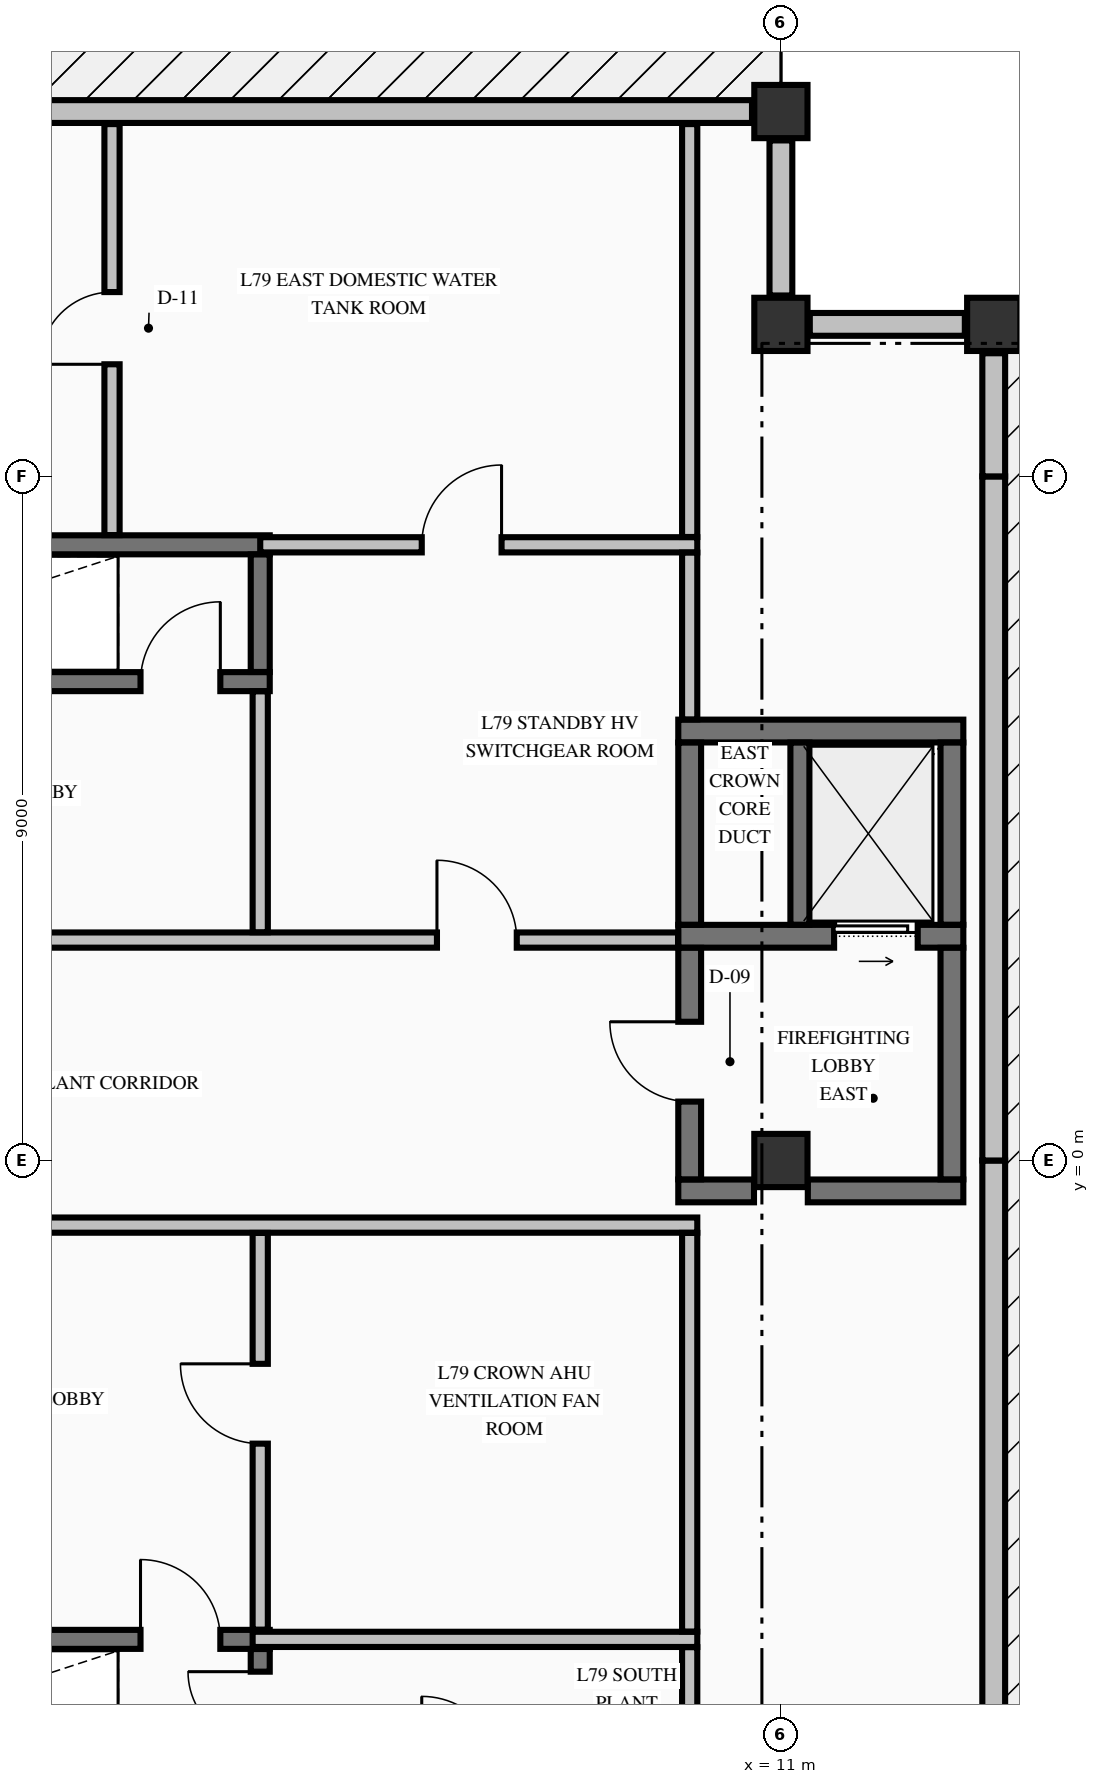
"""IFC4 building model, lengths in metres.
Left out: names, types, materials, properties, quantities, classifications, styles, units other than length and angle.
Written with IfcOpenShell. Run it as: python <this file> out.ifc"""

import sys

from ifc_helpers import new_model, si_unit, direction, frame, frame_2d, origin, origin_2d, place, context, subcontext, project, spatial, rectangle, extrude, element, fill, save


model = new_model("IFC4")
c1 = context("Model", 3, precision=1e-05, world=origin(), true_north=direction((0.0, 1.0)))
c2 = subcontext(c1, "Body", "Model", "MODEL_VIEW")
j1 = project(units=[si_unit("LENGTHUNIT", "METRE"), si_unit("PLANEANGLEUNIT", "RADIAN")], contexts=[c1])
p1 = place(None, origin())
s1 = spatial("IfcSite", under=j1, at=p1, CompositionType="ELEMENT")
p2 = place(p1, origin())
s2 = spatial("IfcBuilding", under=s1, at=p2, CompositionType="ELEMENT")
p3 = place(p2, frame((0.0, 0.0, 294.04)))
s3 = spatial("IfcBuildingStorey", under=s2, at=p3, CompositionType="ELEMENT", Elevation=294.04)
for number, where, z_axis, x_axis in (
    (1, (13.8, 11.0, -0.325), (0.0, 0.0, 1.0), (1.0, 0.0, 0.0)),
    (2, (11.0, 13.8, -0.325), (0.0, 0.0, 1.0), (1.0, 0.0, 0.0)),
    (3, (11.0, 11.0, -0.325), (0.0, 0.0, 1.0), (1.0, 0.0, 0.0)),
    (4, (11.0, 0.0, -0.325), (0.0, 0.0, 1.0), (1.0, 0.0, 0.0)),
):
    element("IfcColumn", number, at=place(p3, frame(where, z_axis=z_axis, x_axis=x_axis)), inside=s3, PredefinedType="COLUMN", context=c2, shape_type="SweptSolid", body=[
        extrude(rectangle(XDim=0.7, YDim=0.7, at=origin_2d()), origin(), (0.0, 0.0, 1.0), 2.935),
    ])
p4 = place(p3, frame((10.62, 13.8, 0.0), z_axis=(0.0, 0.0, 1.0), x_axis=(-1.0, 0.0, 0.0)))
e5 = element("IfcWall", 5, at=p4, inside=s3, PredefinedType="STANDARD", context=c2, shape_type="SweptSolid", body=[
    extrude(rectangle(XDim=10.24, YDim=0.3, at=frame_2d((5.12, 0.0))), origin(), (0.0, 0.0, 1.0), 2.002),
])
for number, where, z_axis, x_axis in (
    (6, (13.8, -9.0, 0.0), (0.0, 0.0, 1.0), (0.0, 1.0, 0.0)),
    (7, (13.8, 0.0, 0.0), (0.0, 0.0, 1.0), (0.0, 1.0, 0.0)),
):
    element("IfcWall", number, at=place(p3, frame(where, z_axis=z_axis, x_axis=x_axis)), inside=s3, PredefinedType="STANDARD", context=c2, shape_type="SweptSolid", body=[
        extrude(rectangle(XDim=9.0, YDim=0.3, at=frame_2d((4.5, 0.0))), origin(), (0.0, 0.0, 1.0), 2.002),
    ])
p5 = place(p3, frame((13.8, 9.0, 0.0), z_axis=(0.0, 0.0, 1.0), x_axis=(0.0, 1.0, 0.0)))
e8 = element("IfcWall", 8, at=p5, inside=s3, PredefinedType="STANDARD", context=c2, shape_type="SweptSolid", body=[
    extrude(rectangle(XDim=1.62, YDim=0.3, at=frame_2d((0.81, 0.0))), origin(), (0.0, 0.0, 1.0), 2.002),
])
for number, where, z_axis, x_axis in (
    (9, (13.42, 11.0, 0.0), (0.0, 0.0, 1.0), (-1.0, 0.0, 0.0)),
    (10, (11.0, 11.38, 0.0), (0.0, 0.0, 1.0), (0.0, 1.0, 0.0)),
):
    element("IfcWall", number, at=place(p3, frame(where, z_axis=z_axis, x_axis=x_axis)), inside=s3, PredefinedType="STANDARD", context=c2, shape_type="SweptSolid", body=[
        extrude(rectangle(XDim=2.04, YDim=0.3, at=frame_2d((1.02, 0.0))), origin(), (0.0, 0.0, 1.0), 2.002),
    ])
p6 = place(p3, frame((-4.475, -6.3, 0.0), z_axis=(0.0, 0.0, 1.0), x_axis=(1.0, 0.0, 0.0)))
e11 = element("IfcWall", 11, at=p6, inside=s3, PredefinedType="SOLIDWALL", context=c2, shape_type="SweptSolid", body=[
    extrude(rectangle(XDim=8.75, YDim=0.25, at=frame_2d((4.375, 0.0))), origin(), (0.0, 0.0, 1.0), 2.61),
])
p7 = place(p6, frame((7.05, 0.0, 0.0)))
e12 = element("IfcOpeningElement", 12, at=p7, cuts=e11, PredefinedType="OPENING", context=c2, shape_type="SweptSolid", body=[
    extrude(rectangle(XDim=1.05, YDim=2.15, at=frame_2d((0.525, 1.075))), frame((0.0, 0.135, 0.0), z_axis=(0.0, -1.0, 0.0), x_axis=(1.0, 0.0, 0.0)), (0.0, 0.0, 1.0), 0.27),
])
p8 = place(p3, frame((9.65, -0.4, 0.0), z_axis=(0.0, 0.0, 1.0), x_axis=(1.0, 0.0, 0.0)))
e13 = element("IfcWall", 13, at=p8, inside=s3, PredefinedType="SHEAR", context=c2, shape_type="SweptSolid", body=[
    extrude(rectangle(XDim=0.996, YDim=0.3, at=frame_2d((0.498, 0.0))), origin(), (0.0, 0.0, 1.0), 2.61),
])
p9 = place(p3, frame((11.354, -0.4, 0.0), z_axis=(0.0, 0.0, 1.0), x_axis=(1.0, 0.0, 0.0)))
e14 = element("IfcWall", 14, at=p9, inside=s3, PredefinedType="SHEAR", context=c2, shape_type="SweptSolid", body=[
    extrude(rectangle(XDim=2.046, YDim=0.3, at=frame_2d((1.023, 0.0))), origin(), (0.0, 0.0, 1.0), 2.61),
])
p10 = place(p3, frame((9.65, 2.95, 0.0), z_axis=(0.0, 0.0, 1.0), x_axis=(1.0, 0.0, 0.0)))
e15 = element("IfcWall", 15, at=p10, inside=s3, PredefinedType="SHEAR", context=c2, shape_type="SweptSolid", body=[
    extrude(rectangle(XDim=3.75, YDim=0.3, at=frame_2d((1.875, 0.0))), origin(), (0.0, 0.0, 1.0), 2.61),
])
p11 = place(p10, frame((2.05, 0.0, 0.0)))
e16 = element("IfcOpeningElement", 16, at=p11, cuts=e15, PredefinedType="OPENING", context=c2, shape_type="SweptSolid", body=[
    extrude(rectangle(XDim=1.1, YDim=2.2, at=frame_2d((0.55, 1.1))), frame((0.0, 0.16, 0.0), z_axis=(0.0, -1.0, 0.0), x_axis=(1.0, 0.0, 0.0)), (0.0, 0.0, 1.0), 0.32),
])
p12 = place(p3, frame((9.65, 5.65, 0.0), z_axis=(0.0, 0.0, 1.0), x_axis=(1.0, 0.0, 0.0)))
e17 = element("IfcWall", 17, at=p12, inside=s3, PredefinedType="SHEAR", context=c2, shape_type="SweptSolid", body=[
    extrude(rectangle(XDim=3.75, YDim=0.3, at=frame_2d((1.875, 0.0))), origin(), (0.0, 0.0, 1.0), 2.61),
])
p13 = place(p3, frame((-4.475, 6.3, 0.0), z_axis=(0.0, 0.0, 1.0), x_axis=(1.0, 0.0, 0.0)))
e18 = element("IfcWall", 18, at=p13, inside=s3, PredefinedType="SOLIDWALL", context=c2, shape_type="SweptSolid", body=[
    extrude(rectangle(XDim=8.75, YDim=0.25, at=frame_2d((4.375, 0.0))), origin(), (0.0, 0.0, 1.0), 2.61),
])
p14 = place(p13, frame((7.05, 0.0, 0.0)))
e19 = element("IfcOpeningElement", 19, at=p14, cuts=e18, PredefinedType="OPENING", context=c2, shape_type="SweptSolid", body=[
    extrude(rectangle(XDim=1.05, YDim=2.15, at=frame_2d((0.525, 1.075))), frame((0.0, 0.135, 0.0), z_axis=(0.0, -1.0, 0.0), x_axis=(1.0, 0.0, 0.0)), (0.0, 0.0, 1.0), 0.27),
])
p15 = place(p3, frame((-4.475, 8.1, 0.0), z_axis=(0.0, 0.0, 1.0), x_axis=(1.0, 0.0, 0.0)))
e20 = element("IfcWall", 20, at=p15, inside=s3, PredefinedType="SOLIDWALL", context=c2, shape_type="SweptSolid", body=[
    extrude(rectangle(XDim=8.75, YDim=0.25, at=frame_2d((4.375, 0.0))), origin(), (0.0, 0.0, 1.0), 2.61),
])
p16 = place(p3, frame((4.05, -6.3, 0.0), z_axis=(0.0, 0.0, 1.0), x_axis=(1.0, 0.0, 0.0)))
e21 = element("IfcWall", 21, at=p16, inside=s3, PredefinedType="PARTITIONING", context=c2, shape_type="SweptSolid", body=[
    extrude(rectangle(XDim=5.85, YDim=0.2, at=frame_2d((2.925, 0.0))), origin(), (0.0, 0.0, 1.0), 2.61),
])
p17 = place(p3, frame((-9.9, -0.85, 0.0), z_axis=(0.0, 0.0, 1.0), x_axis=(1.0, 0.0, 0.0)))
e22 = element("IfcWall", 22, at=p17, inside=s3, PredefinedType="PARTITIONING", context=c2, shape_type="SweptSolid", body=[
    extrude(rectangle(XDim=19.8, YDim=0.2, at=frame_2d((9.9, 0.0))), origin(), (0.0, 0.0, 1.0), 2.61),
])
p18 = place(p17, frame((6.85, 0.0, 0.0)))
e23 = element("IfcOpeningElement", 23, at=p18, cuts=e22, PredefinedType="OPENING", context=c2, shape_type="SweptSolid", body=[
    extrude(rectangle(XDim=1.1, YDim=2.15, at=frame_2d((0.55, 1.075))), frame((0.0, 0.11, 0.0), z_axis=(0.0, -1.0, 0.0), x_axis=(1.0, 0.0, 0.0)), (0.0, 0.0, 1.0), 0.22),
])
p19 = place(p3, frame((-9.647, 2.9, 0.0), z_axis=(0.0, 0.0, 1.0), x_axis=(1.0, 0.0, 0.0)))
e24 = element("IfcWall", 24, at=p19, inside=s3, PredefinedType="PARTITIONING", context=c2, shape_type="SweptSolid", body=[
    extrude(rectangle(XDim=19.294, YDim=0.2, at=frame_2d((9.647, 0.0))), origin(), (0.0, 0.0, 1.0), 2.61),
])
p20 = place(p19, frame((6.597, 0.0, 0.0)))
e25 = element("IfcOpeningElement", 25, at=p20, cuts=e24, PredefinedType="OPENING", context=c2, shape_type="SweptSolid", body=[
    extrude(rectangle(XDim=1.1, YDim=2.15, at=frame_2d((0.55, 1.075))), frame((0.0, 0.11, 0.0), z_axis=(0.0, -1.0, 0.0), x_axis=(1.0, 0.0, 0.0)), (0.0, 0.0, 1.0), 0.22),
])
p21 = place(p19, frame((16.122, 0.0, 0.0)))
e26 = element("IfcOpeningElement", 26, at=p21, cuts=e24, PredefinedType="OPENING", context=c2, shape_type="SweptSolid", body=[
    extrude(rectangle(XDim=1.05, YDim=2.15, at=frame_2d((0.525, 1.075))), frame((0.0, 0.11, 0.0), z_axis=(0.0, -1.0, 0.0), x_axis=(1.0, 0.0, 0.0)), (0.0, 0.0, 1.0), 0.22),
])
p22 = place(p19, frame((2.122, 0.0, 0.0)))
e27 = element("IfcOpeningElement", 27, at=p22, cuts=e24, PredefinedType="OPENING", context=c2, shape_type="SweptSolid", body=[
    extrude(rectangle(XDim=1.05, YDim=2.15, at=frame_2d((0.525, 1.075))), frame((0.0, 0.11, 0.0), z_axis=(0.0, -1.0, 0.0), x_axis=(1.0, 0.0, 0.0)), (0.0, 0.0, 1.0), 0.22),
])
p23 = place(p3, frame((4.15, 8.1, 0.0), z_axis=(0.0, 0.0, 1.0), x_axis=(1.0, 0.0, 0.0)))
e28 = element("IfcWall", 28, at=p23, inside=s3, PredefinedType="PARTITIONING", context=c2, shape_type="SweptSolid", body=[
    extrude(rectangle(XDim=5.75, YDim=0.2, at=frame_2d((2.875, 0.0))), origin(), (0.0, 0.0, 1.0), 2.61),
])
p24 = place(p23, frame((2.125, 0.0, 0.0)))
e29 = element("IfcOpeningElement", 29, at=p24, cuts=e28, PredefinedType="OPENING", context=c2, shape_type="SweptSolid", body=[
    extrude(rectangle(XDim=1.05, YDim=2.15, at=frame_2d((0.525, 1.075))), frame((0.0, 0.11, 0.0), z_axis=(0.0, -1.0, 0.0), x_axis=(1.0, 0.0, 0.0)), (0.0, 0.0, 1.0), 0.22),
])
p25 = place(p3, frame((4.15, -7.973, 0.0), z_axis=(0.0, 0.0, 1.0), x_axis=(0.0, 1.0, 0.0)))
e30 = element("IfcWall", 30, at=p25, inside=s3, PredefinedType="SOLIDWALL", context=c2, shape_type="SweptSolid", body=[
    extrude(rectangle(XDim=1.546, YDim=0.25, at=frame_2d((0.773, 0.0))), origin(), (0.0, 0.0, 1.0), 2.61),
])
p26 = place(p25, frame((0.298, 0.0, 0.0)))
e31 = element("IfcOpeningElement", 31, at=p26, cuts=e30, PredefinedType="OPENING", context=c2, shape_type="SweptSolid", body=[
    extrude(rectangle(XDim=0.95, YDim=2.15, at=frame_2d((0.475, 1.075))), frame((0.0, 0.135, 0.0), z_axis=(0.0, -1.0, 0.0), x_axis=(1.0, 0.0, 0.0)), (0.0, 0.0, 1.0), 0.27),
])
p27 = place(p3, frame((4.15, 6.427, 0.0), z_axis=(0.0, 0.0, 1.0), x_axis=(0.0, 1.0, 0.0)))
e32 = element("IfcWall", 32, at=p27, inside=s3, PredefinedType="SOLIDWALL", context=c2, shape_type="SweptSolid", body=[
    extrude(rectangle(XDim=1.546, YDim=0.25, at=frame_2d((0.773, 0.0))), origin(), (0.0, 0.0, 1.0), 2.61),
])
p28 = place(p3, frame((9.8, -0.248, 0.0), z_axis=(0.0, 0.0, 1.0), x_axis=(0.0, 1.0, 0.0)))
e33 = element("IfcWall", 33, at=p28, inside=s3, PredefinedType="SHEAR", context=c2, shape_type="SweptSolid", body=[
    extrude(rectangle(XDim=3.046, YDim=0.3, at=frame_2d((1.523, 0.0))), origin(), (0.0, 0.0, 1.0), 2.61),
])
p29 = place(p28, frame((1.023, 0.0, 0.0)))
e34 = element("IfcOpeningElement", 34, at=p29, cuts=e33, PredefinedType="OPENING", context=c2, shape_type="SweptSolid", body=[
    extrude(rectangle(XDim=1.05, YDim=2.15, at=frame_2d((0.525, 1.075))), frame((0.0, 0.16, 0.0), z_axis=(0.0, -1.0, 0.0), x_axis=(1.0, 0.0, 0.0)), (0.0, 0.0, 1.0), 0.32),
])
p30 = place(p3, frame((9.8, 3.102, 0.0), z_axis=(0.0, 0.0, 1.0), x_axis=(0.0, 1.0, 0.0)))
e35 = element("IfcWall", 35, at=p30, inside=s3, PredefinedType="SHEAR", context=c2, shape_type="SweptSolid", body=[
    extrude(rectangle(XDim=2.396, YDim=0.3, at=frame_2d((1.198, 0.0))), origin(), (0.0, 0.0, 1.0), 2.61),
])
p31 = place(p3, frame((11.25, 3.102, 0.0), z_axis=(0.0, 0.0, 1.0), x_axis=(0.0, 1.0, 0.0)))
e36 = element("IfcWall", 36, at=p31, inside=s3, PredefinedType="SOLIDWALL", context=c2, shape_type="SweptSolid", body=[
    extrude(rectangle(XDim=2.396, YDim=0.25, at=frame_2d((1.198, 0.0))), origin(), (0.0, 0.0, 1.0), 2.61),
])
p32 = place(p3, frame((13.25, -0.248, 0.0), z_axis=(0.0, 0.0, 1.0), x_axis=(0.0, 1.0, 0.0)))
e37 = element("IfcWall", 37, at=p32, inside=s3, PredefinedType="SHEAR", context=c2, shape_type="SweptSolid", body=[
    extrude(rectangle(XDim=3.046, YDim=0.3, at=frame_2d((1.523, 0.0))), origin(), (0.0, 0.0, 1.0), 2.61),
])
p33 = place(p3, frame((13.25, 3.102, 0.0), z_axis=(0.0, 0.0, 1.0), x_axis=(0.0, 1.0, 0.0)))
e38 = element("IfcWall", 38, at=p33, inside=s3, PredefinedType="SHEAR", context=c2, shape_type="SweptSolid", body=[
    extrude(rectangle(XDim=2.396, YDim=0.3, at=frame_2d((1.198, 0.0))), origin(), (0.0, 0.0, 1.0), 2.61),
])
p34 = place(p3, frame((2.2, 8.228, 0.0), z_axis=(0.0, 0.0, 1.0), x_axis=(0.0, 1.0, 0.0)))
e39 = element("IfcWall", 39, at=p34, inside=s3, PredefinedType="PARTITIONING", context=c2, shape_type="SweptSolid", body=[
    extrude(rectangle(XDim=5.407, YDim=0.2, at=frame_2d((2.704, 0.0))), origin(), (0.0, 0.0, 1.0), 2.61),
])
p35 = place(p34, frame((2.247, 0.0, 0.0)))
e40 = element("IfcOpeningElement", 40, at=p35, cuts=e39, PredefinedType="OPENING", context=c2, shape_type="SweptSolid", body=[
    extrude(rectangle(XDim=0.95, YDim=2.15, at=frame_2d((0.475, 1.075))), frame((0.0, 0.11, 0.0), z_axis=(0.0, -1.0, 0.0), x_axis=(1.0, 0.0, 0.0)), (0.0, 0.0, 1.0), 0.22),
])
p36 = place(p3, frame((4.15, -6.172, 0.0), z_axis=(0.0, 0.0, 1.0), x_axis=(0.0, 1.0, 0.0)))
e41 = element("IfcWall", 41, at=p36, inside=s3, PredefinedType="PARTITIONING", context=c2, shape_type="SweptSolid", body=[
    extrude(rectangle(XDim=5.219, YDim=0.2, at=frame_2d((2.61, 0.0))), origin(), (0.0, 0.0, 1.0), 2.61),
])
p37 = place(p36, frame((2.447, 0.0, 0.0)))
e42 = element("IfcOpeningElement", 42, at=p37, cuts=e41, PredefinedType="OPENING", context=c2, shape_type="SweptSolid", body=[
    extrude(rectangle(XDim=1.05, YDim=2.15, at=frame_2d((0.525, 1.075))), frame((0.0, 0.11, 0.0), z_axis=(0.0, -1.0, 0.0), x_axis=(1.0, 0.0, 0.0)), (0.0, 0.0, 1.0), 0.22),
])
p38 = place(p3, frame((4.15, 3.003, 0.0), z_axis=(0.0, 0.0, 1.0), x_axis=(0.0, 1.0, 0.0)))
e43 = element("IfcWall", 43, at=p38, inside=s3, PredefinedType="PARTITIONING", context=c2, shape_type="SweptSolid", body=[
    extrude(rectangle(XDim=3.169, YDim=0.2, at=frame_2d((1.584, 0.0))), origin(), (0.0, 0.0, 1.0), 2.61),
])
p39 = place(p3, frame((9.8, -7.997, 0.0), z_axis=(0.0, 0.0, 1.0), x_axis=(0.0, 1.0, 0.0)))
e44 = element("IfcWall", 44, at=p39, inside=s3, PredefinedType="PARTITIONING", context=c2, shape_type="SweptSolid", body=[
    extrude(rectangle(XDim=1.594, YDim=0.2, at=frame_2d((0.797, 0.0))), origin(), (0.0, 0.0, 1.0), 2.61),
])
p40 = place(p3, frame((9.8, -6.197, 0.0), z_axis=(0.0, 0.0, 1.0), x_axis=(0.0, 1.0, 0.0)))
e45 = element("IfcWall", 45, at=p40, inside=s3, PredefinedType="PARTITIONING", context=c2, shape_type="SweptSolid", body=[
    extrude(rectangle(XDim=5.244, YDim=0.2, at=frame_2d((2.622, 0.0))), origin(), (0.0, 0.0, 1.0), 2.61),
])
p41 = place(p3, frame((9.8, 5.803, 0.0), z_axis=(0.0, 0.0, 1.0), x_axis=(0.0, 1.0, 0.0)))
e46 = element("IfcWall", 46, at=p41, inside=s3, PredefinedType="PARTITIONING", context=c2, shape_type="SweptSolid", body=[
    extrude(rectangle(XDim=2.194, YDim=0.2, at=frame_2d((1.097, 0.0))), origin(), (0.0, 0.0, 1.0), 2.61),
])
p42 = place(p3, frame((9.8, 8.203, 0.0), z_axis=(0.0, 0.0, 1.0), x_axis=(0.0, 1.0, 0.0)))
e47 = element("IfcWall", 47, at=p42, inside=s3, PredefinedType="PARTITIONING", context=c2, shape_type="SweptSolid", body=[
    extrude(rectangle(XDim=5.432, YDim=0.2, at=frame_2d((2.716, 0.0))), origin(), (0.0, 0.0, 1.0), 2.61),
])
p43 = place(p11, origin())
e48 = element("IfcDoor", 48, at=p43, inside=s3, OperationType="SLIDING_TO_RIGHT", PredefinedType="DOOR", context=c2, shape_type="SweptSolid", body=[
    extrude(rectangle(XDim=1.1, YDim=2.2, at=frame_2d((0.55, 1.1))), frame((0.0, 0.025, 0.0), z_axis=(0.0, -1.0, 0.0), x_axis=(1.0, 0.0, 0.0)), (0.0, 0.0, 1.0), 0.05),
])
fill(e16, e48)
p44 = place(p29, origin())
e49 = element("IfcDoor", 49, at=p44, inside=s3, OperationType="SINGLE_SWING_RIGHT", PredefinedType="DOOR", context=c2, shape_type="SweptSolid", body=[
    extrude(rectangle(XDim=1.05, YDim=2.15, at=frame_2d((0.525, 1.075))), frame((0.0, 0.025, 0.0), z_axis=(0.0, -1.0, 0.0), x_axis=(1.0, 0.0, 0.0)), (0.0, 0.0, 1.0), 0.05),
])
fill(e34, e49)
p45 = place(p7, origin())
e50 = element("IfcDoor", 50, at=p45, inside=s3, OperationType="SINGLE_SWING_LEFT", PredefinedType="DOOR", context=c2, shape_type="SweptSolid", body=[
    extrude(rectangle(XDim=1.05, YDim=2.15, at=frame_2d((0.525, 1.075))), frame((0.0, 0.025, 0.0), z_axis=(0.0, -1.0, 0.0), x_axis=(1.0, 0.0, 0.0)), (0.0, 0.0, 1.0), 0.05),
])
fill(e12, e50)
p46 = place(p14, origin())
e51 = element("IfcDoor", 51, at=p46, inside=s3, OperationType="SINGLE_SWING_RIGHT", PredefinedType="DOOR", context=c2, shape_type="SweptSolid", body=[
    extrude(rectangle(XDim=1.05, YDim=2.15, at=frame_2d((0.525, 1.075))), frame((0.0, 0.025, 0.0), z_axis=(0.0, -1.0, 0.0), x_axis=(1.0, 0.0, 0.0)), (0.0, 0.0, 1.0), 0.05),
])
fill(e19, e51)
p47 = place(p37, origin())
e52 = element("IfcDoor", 52, at=p47, inside=s3, OperationType="SINGLE_SWING_RIGHT", PredefinedType="DOOR", context=c2, shape_type="SweptSolid", body=[
    extrude(rectangle(XDim=1.05, YDim=2.15, at=frame_2d((0.525, 1.075))), frame((0.0, 0.025, 0.0), z_axis=(0.0, -1.0, 0.0), x_axis=(1.0, 0.0, 0.0)), (0.0, 0.0, 1.0), 0.05),
])
fill(e42, e52)
p48 = place(p21, origin())
e53 = element("IfcDoor", 53, at=p48, inside=s3, OperationType="SINGLE_SWING_LEFT", PredefinedType="DOOR", context=c2, shape_type="SweptSolid", body=[
    extrude(rectangle(XDim=1.05, YDim=2.15, at=frame_2d((0.525, 1.075))), frame((0.0, 0.025, 0.0), z_axis=(0.0, -1.0, 0.0), x_axis=(1.0, 0.0, 0.0)), (0.0, 0.0, 1.0), 0.05),
])
fill(e26, e53)
p49 = place(p24, origin())
e54 = element("IfcDoor", 54, at=p49, inside=s3, OperationType="SINGLE_SWING_RIGHT", PredefinedType="DOOR", context=c2, shape_type="SweptSolid", body=[
    extrude(rectangle(XDim=1.05, YDim=2.15, at=frame_2d((0.525, 1.075))), frame((0.0, 0.025, 0.0), z_axis=(0.0, -1.0, 0.0), x_axis=(1.0, 0.0, 0.0)), (0.0, 0.0, 1.0), 0.05),
])
fill(e29, e54)
p50 = place(p35, origin())
e55 = element("IfcDoor", 55, at=p50, inside=s3, OperationType="SINGLE_SWING_LEFT", PredefinedType="DOOR", context=c2, shape_type="SweptSolid", body=[
    extrude(rectangle(XDim=0.95, YDim=2.15, at=frame_2d((0.475, 1.075))), frame((0.0, 0.025, 0.0), z_axis=(0.0, -1.0, 0.0), x_axis=(1.0, 0.0, 0.0)), (0.0, 0.0, 1.0), 0.05),
])
fill(e40, e55)
p51 = place(p26, origin())
e56 = element("IfcDoor", 56, at=p51, inside=s3, OperationType="SINGLE_SWING_RIGHT", PredefinedType="DOOR", context=c2, shape_type="SweptSolid", body=[
    extrude(rectangle(XDim=0.95, YDim=2.15, at=frame_2d((0.475, 1.075))), frame((0.0, 0.025, 0.0), z_axis=(0.0, -1.0, 0.0), x_axis=(1.0, 0.0, 0.0)), (0.0, 0.0, 1.0), 0.05),
])
fill(e31, e56)
save(model, sys.argv[1])
